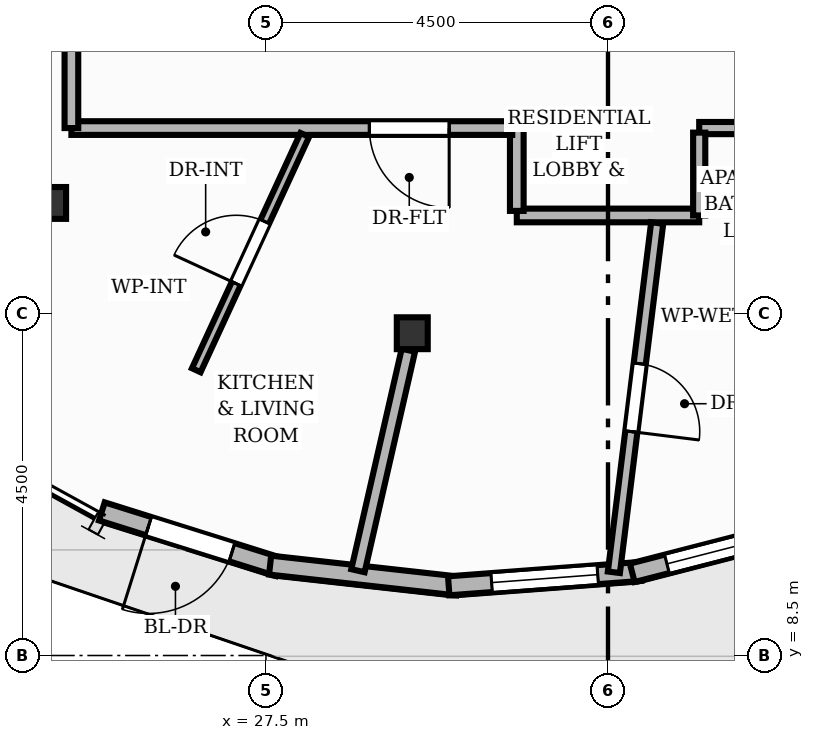
"""IFC4 building model, lengths in metres.
Left out: names, types, materials, properties, quantities, classifications, styles, units other than length and angle.
Written with IfcOpenShell. Run it as: python <this file> out.ifc"""

import sys

from ifc_helpers import new_model, si_unit, direction, frame, frame_2d, origin, origin_2d, place, context, subcontext, project, spatial, rectangle, i_section, extrude, element, fill, save


model = new_model("IFC4")
c1 = context("Model", 3, precision=1e-05, world=origin(), true_north=direction((0.0, 1.0)))
c2 = subcontext(c1, "Body", "Model", "MODEL_VIEW")
j1 = project(units=[si_unit("LENGTHUNIT", "METRE"), si_unit("PLANEANGLEUNIT", "RADIAN")], contexts=[c1])
p1 = place(None, origin())
s1 = spatial("IfcSite", under=j1, at=p1, CompositionType="ELEMENT")
p2 = place(p1, origin())
s2 = spatial("IfcBuilding", under=s1, at=p2, CompositionType="ELEMENT")
p3 = place(p2, frame((0.0, 0.0, 223.84)))
s3 = spatial("IfcBuildingStorey", under=s2, at=p3, CompositionType="ELEMENT", Elevation=223.84)
for number, where, z_axis, x_axis in (
    (1, (24.667, 14.455, 0.0), (0.0, 0.0, 1.0), (1.0, 0.0, 0.0)),
    (2, (29.425, 12.74, 0.0), (0.0, 0.0, 1.0), (1.0, 0.0, 0.0)),
):
    element("IfcColumn", number, at=place(p3, frame(where, z_axis=z_axis, x_axis=x_axis)), inside=s3, PredefinedType="COLUMN", context=c2, shape_type="SweptSolid", body=[
        extrude(i_section(OverallWidth=0.407, OverallDepth=0.419, WebThickness=0.031, FlangeThickness=0.049, at=origin_2d()), origin(), (0.0, 0.0, 1.0), 3.2),
    ])
p4 = place(p3, frame((27.666, 9.666, 0.0), z_axis=(0.0, 0.0, 1.0), x_axis=(-0.95407801166, 0.299558254212, 0.0)))
e3 = element("IfcWall", 3, at=p4, inside=s3, PredefinedType="SOLIDWALL", context=c2, shape_type="SweptSolid", body=[
    extrude(rectangle(XDim=2.437, YDim=0.25, at=frame_2d((1.218, 0.0))), origin(), (0.0, 0.0, 1.0), 2.96),
])
p5 = place(p4, frame((0.643, 0.0, 0.0)))
e4 = element("IfcOpeningElement", 4, at=p5, cuts=e3, PredefinedType="OPENING", context=c2, shape_type="SweptSolid", body=[
    extrude(rectangle(XDim=1.15, YDim=2.2, at=frame_2d((0.575, 1.1))), frame((0.0, 0.135, 0.0), z_axis=(0.0, -1.0, 0.0), x_axis=(1.0, 0.0, 0.0)), (0.0, 0.0, 1.0), 0.27),
])
p6 = place(p3, frame((30.017, 9.415, 0.0), z_axis=(0.0, 0.0, 1.0), x_axis=(-0.993859679734, 0.110647806121, 0.0)))
e5 = element("IfcWall", 5, at=p6, inside=s3, PredefinedType="SOLIDWALL", context=c2, shape_type="SweptSolid", body=[
    extrude(rectangle(XDim=2.478, YDim=0.25, at=frame_2d((1.239, 0.0))), origin(), (0.0, 0.0, 1.0), 2.96),
])
p7 = place(p3, frame((32.429, 9.606, 0.0), z_axis=(0.0, 0.0, 1.0), x_axis=(-0.997203982256, -0.074727623888, 0.0)))
e6 = element("IfcWall", 6, at=p7, inside=s3, PredefinedType="SOLIDWALL", context=c2, shape_type="SweptSolid", body=[
    extrude(rectangle(XDim=2.532, YDim=0.25, at=frame_2d((1.266, 0.0))), origin(), (0.0, 0.0, 1.0), 2.96),
])
p8 = place(p7, frame((0.566, 0.0, 0.85)))
e7 = element("IfcOpeningElement", 7, at=p8, cuts=e6, PredefinedType="OPENING", context=c2, shape_type="SweptSolid", body=[
    extrude(rectangle(XDim=1.4, YDim=1.55, at=frame_2d((0.7, 0.775))), frame((0.0, 0.135, 0.0), z_axis=(0.0, -1.0, 0.0), x_axis=(1.0, 0.0, 0.0)), (0.0, 0.0, 1.0), 0.27),
])
p9 = place(p3, frame((34.829, 10.234, 0.0), z_axis=(0.0, 0.0, 1.0), x_axis=(-0.968423445169, -0.249311112562, 0.0)))
e8 = element("IfcWall", 8, at=p9, inside=s3, PredefinedType="SOLIDWALL", context=c2, shape_type="SweptSolid", body=[
    extrude(rectangle(XDim=2.592, YDim=0.25, at=frame_2d((1.296, 0.0))), origin(), (0.0, 0.0, 1.0), 2.96),
])
p10 = place(p9, frame((0.471, 0.0, 0.85)))
e9 = element("IfcOpeningElement", 9, at=p10, cuts=e8, PredefinedType="OPENING", context=c2, shape_type="SweptSolid", body=[
    extrude(rectangle(XDim=1.65, YDim=1.55, at=frame_2d((0.825, 0.775))), frame((0.0, 0.135, 0.0), z_axis=(0.0, -1.0, 0.0), x_axis=(1.0, 0.0, 0.0)), (0.0, 0.0, 1.0), 0.27),
])
p11 = place(p3, frame((29.374, 12.517, 0.0), z_axis=(0.0, 0.0, 1.0), x_axis=(-0.22291168124, -0.974838644272, 0.0)))
e10 = element("IfcWall", 10, at=p11, inside=s3, PredefinedType="PARTITIONING", context=c2, shape_type="SweptSolid", body=[
    extrude(rectangle(XDim=2.976, YDim=0.18, at=frame_2d((1.488, 0.0))), origin(), (0.0, 0.0, 1.0), 2.403),
])
p12 = place(p3, frame((33.2, 14.29, 0.0), z_axis=(0.0, 0.0, 1.0), x_axis=(-1.0, 0.0, 0.0)))
e11 = element("IfcWall", 11, at=p12, inside=s3, PredefinedType="PARTITIONING", context=c2, shape_type="SweptSolid", body=[
    extrude(rectangle(XDim=2.4, YDim=0.18, at=frame_2d((1.2, 0.0))), origin(), (0.0, 0.0, 1.0), 2.955),
])
p13 = place(p3, frame((30.8, 14.35, 0.0), z_axis=(0.0, 0.0, 1.0), x_axis=(0.0, 1.0, 0.0)))
e12 = element("IfcWall", 12, at=p13, inside=s3, PredefinedType="PARTITIONING", context=c2, shape_type="SweptSolid", body=[
    extrude(rectangle(XDim=1.09, YDim=0.18, at=frame_2d((0.545, 0.0))), origin(), (0.0, 0.0, 1.0), 2.955),
])
p14 = place(p3, frame((30.74, 15.44, 0.0), z_axis=(0.0, 0.0, 1.0), x_axis=(-1.0, 0.0, 0.0)))
e13 = element("IfcWall", 13, at=p14, inside=s3, PredefinedType="PARTITIONING", context=c2, shape_type="SweptSolid", body=[
    extrude(rectangle(XDim=5.8, YDim=0.18, at=frame_2d((2.9, 0.0))), origin(), (0.0, 0.0, 1.0), 2.955),
])
p15 = place(p14, frame((0.83, 0.0, 0.0)))
e14 = element("IfcOpeningElement", 14, at=p15, cuts=e13, PredefinedType="OPENING", context=c2, shape_type="SweptSolid", body=[
    extrude(rectangle(XDim=1.05, YDim=2.15, at=frame_2d((0.525, 1.075))), frame((0.0, 0.1, 0.0), z_axis=(0.0, -1.0, 0.0), x_axis=(1.0, 0.0, 0.0)), (0.0, 0.0, 1.0), 0.2),
])
p16 = place(p3, frame((33.978, 15.44, 0.0), z_axis=(0.0, 0.0, 1.0), x_axis=(-1.0, 0.0, 0.0)))
e15 = element("IfcWall", 15, at=p16, inside=s3, PredefinedType="PLUMBINGWALL", context=c2, shape_type="SweptSolid", body=[
    extrude(rectangle(XDim=0.778, YDim=0.16, at=frame_2d((0.389, 0.0))), origin(), (0.0, 0.0, 1.0), 2.955),
])
p17 = place(p3, frame((33.2, 15.38, 0.0), z_axis=(0.0, 0.0, 1.0), x_axis=(0.0, -1.0, 0.0)))
e16 = element("IfcWall", 16, at=p17, inside=s3, PredefinedType="PLUMBINGWALL", context=c2, shape_type="SweptSolid", body=[
    extrude(rectangle(XDim=1.09, YDim=0.16, at=frame_2d((0.545, 0.0))), origin(), (0.0, 0.0, 1.0), 2.955),
])
p18 = place(p3, frame((24.94, 15.44, 0.0), z_axis=(0.0, 0.0, 1.0), x_axis=(0.0, 1.0, 0.0)))
e17 = element("IfcWall", 17, at=p18, inside=s3, PredefinedType="PARTITIONING", context=c2, shape_type="SweptSolid", body=[
    extrude(rectangle(XDim=7.982, YDim=0.18, at=frame_2d((3.991, 0.0))), origin(), (0.0, 0.0, 1.0), 2.955),
])
p19 = place(p3, frame((32.647, 14.191, 0.0), z_axis=(0.0, 0.0, 1.0), x_axis=(-0.123041966912, -0.992401468348, 0.0)))
e18 = element("IfcWall", 18, at=p19, inside=s3, PredefinedType="PLUMBINGWALL", context=c2, shape_type="SweptSolid", body=[
    extrude(rectangle(XDim=4.631, YDim=0.16, at=frame_2d((2.315, 0.0))), origin(), (0.0, 0.0, 1.0), 2.692),
])
p20 = place(p19, frame((1.865, 0.0, 0.0)))
e19 = element("IfcOpeningElement", 19, at=p20, cuts=e18, PredefinedType="OPENING", context=c2, shape_type="SweptSolid", body=[
    extrude(rectangle(XDim=0.9, YDim=2.1, at=frame_2d((0.45, 1.05))), frame((0.0, 0.09, 0.0), z_axis=(0.0, -1.0, 0.0), x_axis=(1.0, 0.0, 0.0)), (0.0, 0.0, 1.0), 0.18),
])
p21 = place(p3, frame((26.583, 12.253, 0.0), z_axis=(0.0, 0.0, 1.0), x_axis=(0.41880384085, 0.908076727424, 0.0)))
e20 = element("IfcWall", 20, at=p21, inside=s3, PredefinedType="PARTITIONING", context=c2, shape_type="SweptSolid", body=[
    extrude(rectangle(XDim=3.409, YDim=0.125, at=frame_2d((1.705, 0.0))), origin(), (0.0, 0.0, 1.0), 2.955),
])
p22 = place(p21, frame((1.255, 0.0, 0.0)))
e21 = element("IfcOpeningElement", 21, at=p22, cuts=e20, PredefinedType="OPENING", context=c2, shape_type="SweptSolid", body=[
    extrude(rectangle(XDim=0.9, YDim=2.1, at=frame_2d((0.45, 1.05))), frame((0.0, 0.073, 0.0), z_axis=(0.0, -1.0, 0.0), x_axis=(1.0, 0.0, 0.0)), (0.0, 0.0, 1.0), 0.145),
])
p23 = place(p5, origin())
e22 = element("IfcDoor", 22, at=p23, inside=s3, OperationType="SINGLE_SWING_RIGHT", PredefinedType="DOOR", context=c2, shape_type="SweptSolid", body=[
    extrude(rectangle(XDim=1.15, YDim=2.2, at=frame_2d((0.575, 1.1))), frame((0.0, 0.025, 0.0), z_axis=(0.0, -1.0, 0.0), x_axis=(1.0, 0.0, 0.0)), (0.0, 0.0, 1.0), 0.05),
])
fill(e4, e22)
p24 = place(p8, origin())
e23 = element("IfcWindow", 23, at=p24, inside=s3, PartitioningType="SINGLE_PANEL", PredefinedType="WINDOW", context=c2, shape_type="SweptSolid", body=[
    extrude(rectangle(XDim=1.4, YDim=1.55, at=frame_2d((0.7, 0.775))), frame((0.0, 0.03, 0.0), z_axis=(0.0, -1.0, 0.0), x_axis=(1.0, 0.0, 0.0)), (0.0, 0.0, 1.0), 0.06),
])
fill(e7, e23)
p25 = place(p10, origin())
e24 = element("IfcWindow", 24, at=p25, inside=s3, PartitioningType="SINGLE_PANEL", PredefinedType="WINDOW", context=c2, shape_type="SweptSolid", body=[
    extrude(rectangle(XDim=1.65, YDim=1.55, at=frame_2d((0.825, 0.775))), frame((0.0, 0.03, 0.0), z_axis=(0.0, -1.0, 0.0), x_axis=(1.0, 0.0, 0.0)), (0.0, 0.0, 1.0), 0.06),
])
fill(e9, e24)
p26 = place(p15, origin())
e25 = element("IfcDoor", 25, at=p26, inside=s3, OperationType="SINGLE_SWING_LEFT", PredefinedType="DOOR", context=c2, shape_type="SweptSolid", body=[
    extrude(rectangle(XDim=1.05, YDim=2.15, at=frame_2d((0.525, 1.075))), frame((0.0, 0.025, 0.0), z_axis=(0.0, -1.0, 0.0), x_axis=(1.0, 0.0, 0.0)), (0.0, 0.0, 1.0), 0.05),
])
fill(e14, e25)
p27 = place(p20, origin())
e26 = element("IfcDoor", 26, at=p27, inside=s3, OperationType="SINGLE_SWING_RIGHT", PredefinedType="DOOR", context=c2, shape_type="SweptSolid", body=[
    extrude(rectangle(XDim=0.9, YDim=2.1, at=frame_2d((0.45, 1.05))), frame((0.0, 0.025, 0.0), z_axis=(0.0, -1.0, 0.0), x_axis=(1.0, 0.0, 0.0)), (0.0, 0.0, 1.0), 0.05),
])
fill(e19, e26)
p28 = place(p22, origin())
e27 = element("IfcDoor", 27, at=p28, inside=s3, OperationType="SINGLE_SWING_LEFT", PredefinedType="DOOR", context=c2, shape_type="SweptSolid", body=[
    extrude(rectangle(XDim=0.9, YDim=2.1, at=frame_2d((0.45, 1.05))), frame((0.0, 0.025, 0.0), z_axis=(0.0, -1.0, 0.0), x_axis=(1.0, 0.0, 0.0)), (0.0, 0.0, 1.0), 0.05),
])
fill(e21, e27)
save(model, sys.argv[1])
